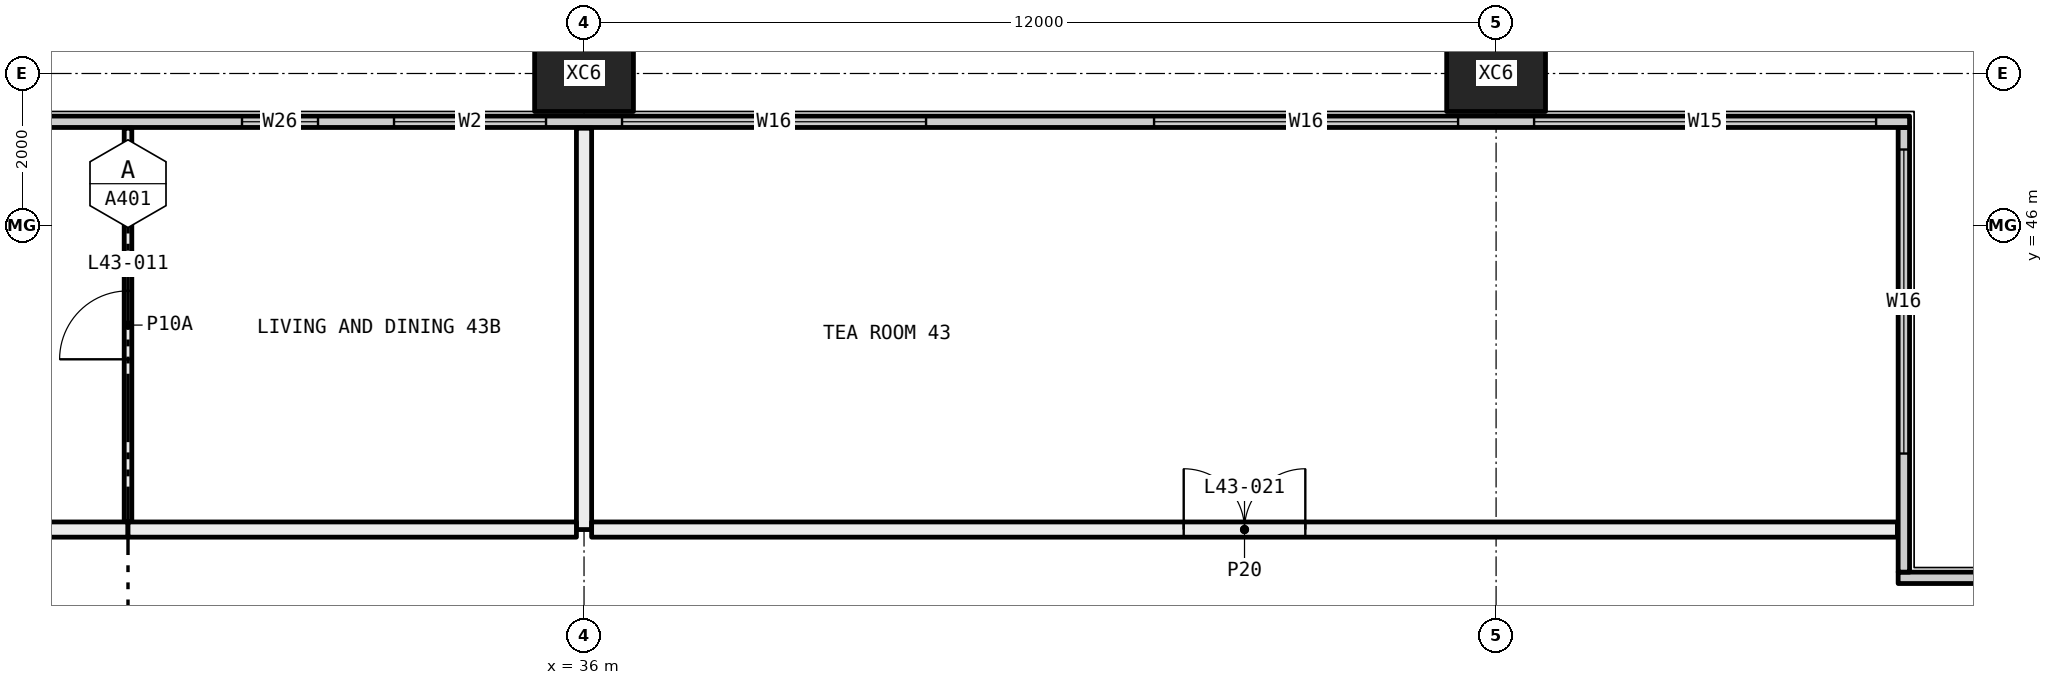
"""IFC4 building model, lengths in metres.
Left out: names, types, materials, properties, quantities, classifications, styles, units other than length and angle.
Written with IfcOpenShell. Run it as: python <this file> out.ifc"""

import sys

from ifc_helpers import new_model, si_unit, direction, frame, frame_2d, origin, origin_2d, place, context, subcontext, project, spatial, rectangle, hollow_rectangle, extrude, element, fill, save


model = new_model("IFC4")
c1 = context("Model", 3, precision=1e-05, world=origin(), true_north=direction((0.0, 1.0)))
c2 = subcontext(c1, "Body", "Model", "MODEL_VIEW")
j1 = project(units=[si_unit("LENGTHUNIT", "METRE"), si_unit("PLANEANGLEUNIT", "RADIAN")], contexts=[c1])
p1 = place(None, origin())
s1 = spatial("IfcSite", under=j1, at=p1, CompositionType="ELEMENT")
p2 = place(p1, origin())
s2 = spatial("IfcBuilding", under=s1, at=p2, CompositionType="ELEMENT")
p3 = place(p2, frame((0.0, 0.0, 165.15)))
s3 = spatial("IfcBuildingStorey", under=s2, at=p3, CompositionType="ELEMENT", Elevation=165.15)
for number, where, z_axis, x_axis in (
    (1, (36.0, 48.0, -0.4), (0.0, 0.0, 1.0), (1.0, 0.0, 0.0)),
    (2, (48.0, 48.0, -0.4), (0.0, 0.0, 1.0), (1.0, 0.0, 0.0)),
):
    element("IfcColumn", number, at=place(p3, frame(where, z_axis=z_axis, x_axis=x_axis)), inside=s3, PredefinedType="COLUMN", context=c2, shape_type="SweptSolid", body=[
        extrude(hollow_rectangle(XDim=1.3, YDim=1.0, WallThickness=0.05, at=origin_2d()), origin(), (0.0, 0.0, 1.0), 3.45),
    ])
p4 = place(p3, frame((53.29, 41.365, 0.0), z_axis=(0.0, 0.0, 1.0), x_axis=(1.0, 0.0, 0.0)))
e3 = element("IfcWall", 3, at=p4, inside=s3, PredefinedType="ELEMENTEDWALL", context=c2, shape_type="SweptSolid", body=[
    extrude(rectangle(XDim=6.15, YDim=0.15, at=frame_2d((3.075, 0.0))), origin(), (0.0, 0.0, 1.0), 3.05),
])
p5 = place(p4, frame((1.71, 0.0, 0.45)))
e4 = element("IfcOpeningElement", 4, at=p5, cuts=e3, PredefinedType="OPENING", context=c2, shape_type="SweptSolid", body=[
    extrude(rectangle(XDim=4.0, YDim=2.55, at=frame_2d((2.0, 1.275))), frame((0.0, 0.085, 0.0), z_axis=(0.0, -1.0, 0.0), x_axis=(1.0, 0.0, 0.0)), (0.0, 0.0, 1.0), 0.17),
])
p6 = place(p3, frame((53.365, 41.44, 0.0), z_axis=(0.0, 0.0, 1.0), x_axis=(0.0, 1.0, 0.0)))
e5 = element("IfcWall", 5, at=p6, inside=s3, PredefinedType="ELEMENTEDWALL", context=c2, shape_type="SweptSolid", body=[
    extrude(rectangle(XDim=5.85, YDim=0.15, at=frame_2d((2.925, 0.0))), origin(), (0.0, 0.0, 1.0), 3.05),
])
p7 = place(p6, frame((1.56, 0.0, 0.45)))
e6 = element("IfcOpeningElement", 6, at=p7, cuts=e5, PredefinedType="OPENING", context=c2, shape_type="SweptSolid", body=[
    extrude(rectangle(XDim=4.0, YDim=2.55, at=frame_2d((2.0, 1.275))), frame((0.0, 0.085, 0.0), z_axis=(0.0, -1.0, 0.0), x_axis=(1.0, 0.0, 0.0)), (0.0, 0.0, 1.0), 0.17),
])
p8 = place(p3, frame((6.56, 47.365, 0.0), z_axis=(0.0, 0.0, 1.0), x_axis=(1.0, 0.0, 0.0)))
e7 = element("IfcWall", 7, at=p8, inside=s3, PredefinedType="ELEMENTEDWALL", context=c2, shape_type="SweptSolid", body=[
    extrude(rectangle(XDim=46.88, YDim=0.15, at=frame_2d((23.44, 0.0))), origin(), (0.0, 0.0, 1.0), 3.05),
])
p9 = place(p8, frame((0.44, 0.0, 0.45)))
e8 = element("IfcOpeningElement", 8, at=p9, cuts=e7, PredefinedType="OPENING", context=c2, shape_type="SweptSolid", body=[
    extrude(rectangle(XDim=4.5, YDim=2.55, at=frame_2d((2.25, 1.275))), frame((0.0, 0.085, 0.0), z_axis=(0.0, -1.0, 0.0), x_axis=(1.0, 0.0, 0.0)), (0.0, 0.0, 1.0), 0.17),
])
p10 = place(p8, frame((5.94, 0.0, 0.45)))
e9 = element("IfcOpeningElement", 9, at=p10, cuts=e7, PredefinedType="OPENING", context=c2, shape_type="SweptSolid", body=[
    extrude(rectangle(XDim=4.0, YDim=2.55, at=frame_2d((2.0, 1.275))), frame((0.0, 0.085, 0.0), z_axis=(0.0, -1.0, 0.0), x_axis=(1.0, 0.0, 0.0)), (0.0, 0.0, 1.0), 0.17),
])
p11 = place(p8, frame((12.94, 0.0, 0.45)))
e10 = element("IfcOpeningElement", 10, at=p11, cuts=e7, PredefinedType="OPENING", context=c2, shape_type="SweptSolid", body=[
    extrude(rectangle(XDim=4.0, YDim=2.55, at=frame_2d((2.0, 1.275))), frame((0.0, 0.085, 0.0), z_axis=(0.0, -1.0, 0.0), x_axis=(1.0, 0.0, 0.0)), (0.0, 0.0, 1.0), 0.17),
])
p12 = place(p8, frame((17.94, 0.0, 0.45)))
e11 = element("IfcOpeningElement", 11, at=p12, cuts=e7, PredefinedType="OPENING", context=c2, shape_type="SweptSolid", body=[
    extrude(rectangle(XDim=4.0, YDim=2.55, at=frame_2d((2.0, 1.275))), frame((0.0, 0.085, 0.0), z_axis=(0.0, -1.0, 0.0), x_axis=(1.0, 0.0, 0.0)), (0.0, 0.0, 1.0), 0.17),
])
p13 = place(p8, frame((24.94, 0.0, 0.45)))
e12 = element("IfcOpeningElement", 12, at=p13, cuts=e7, PredefinedType="OPENING", context=c2, shape_type="SweptSolid", body=[
    extrude(rectangle(XDim=1.0, YDim=2.55, at=frame_2d((0.5, 1.275))), frame((0.0, 0.085, 0.0), z_axis=(0.0, -1.0, 0.0), x_axis=(1.0, 0.0, 0.0)), (0.0, 0.0, 1.0), 0.17),
])
p14 = place(p8, frame((26.94, 0.0, 0.45)))
e13 = element("IfcOpeningElement", 13, at=p14, cuts=e7, PredefinedType="OPENING", context=c2, shape_type="SweptSolid", body=[
    extrude(rectangle(XDim=2.0, YDim=2.55, at=frame_2d((1.0, 1.275))), frame((0.0, 0.085, 0.0), z_axis=(0.0, -1.0, 0.0), x_axis=(1.0, 0.0, 0.0)), (0.0, 0.0, 1.0), 0.17),
])
p15 = place(p8, frame((29.94, 0.0, 0.45)))
e14 = element("IfcOpeningElement", 14, at=p15, cuts=e7, PredefinedType="OPENING", context=c2, shape_type="SweptSolid", body=[
    extrude(rectangle(XDim=4.0, YDim=2.55, at=frame_2d((2.0, 1.275))), frame((0.0, 0.085, 0.0), z_axis=(0.0, -1.0, 0.0), x_axis=(1.0, 0.0, 0.0)), (0.0, 0.0, 1.0), 0.17),
])
p16 = place(p8, frame((36.94, 0.0, 0.45)))
e15 = element("IfcOpeningElement", 15, at=p16, cuts=e7, PredefinedType="OPENING", context=c2, shape_type="SweptSolid", body=[
    extrude(rectangle(XDim=4.0, YDim=2.55, at=frame_2d((2.0, 1.275))), frame((0.0, 0.085, 0.0), z_axis=(0.0, -1.0, 0.0), x_axis=(1.0, 0.0, 0.0)), (0.0, 0.0, 1.0), 0.17),
])
p17 = place(p8, frame((41.94, 0.0, 0.45)))
e16 = element("IfcOpeningElement", 16, at=p17, cuts=e7, PredefinedType="OPENING", context=c2, shape_type="SweptSolid", body=[
    extrude(rectangle(XDim=4.5, YDim=2.55, at=frame_2d((2.25, 1.275))), frame((0.0, 0.085, 0.0), z_axis=(0.0, -1.0, 0.0), x_axis=(1.0, 0.0, 0.0)), (0.0, 0.0, 1.0), 0.17),
])
p18 = place(p3, frame((30.0, 42.1, 0.0), z_axis=(0.0, 0.0, 1.0), x_axis=(0.0, 1.0, 0.0)))
e17 = element("IfcWall", 17, at=p18, inside=s3, PredefinedType="PARTITIONING", context=c2, shape_type="SweptSolid", body=[
    extrude(rectangle(XDim=5.18, YDim=0.1, at=frame_2d((2.59, 0.0))), origin(), (0.0, 0.0, 1.0), 3.05),
])
p19 = place(p18, frame((2.14, 0.0, 0.0)))
e18 = element("IfcOpeningElement", 18, at=p19, cuts=e17, PredefinedType="OPENING", context=c2, shape_type="SweptSolid", body=[
    extrude(rectangle(XDim=0.9, YDim=2.1, at=frame_2d((0.45, 1.05))), frame((0.0, 0.06, 0.0), z_axis=(0.0, -1.0, 0.0), x_axis=(1.0, 0.0, 0.0)), (0.0, 0.0, 1.0), 0.12),
])
p20 = place(p3, frame((24.0, 42.0, 0.0), z_axis=(0.0, 0.0, 1.0), x_axis=(1.0, 0.0, 0.0)))
e19 = element("IfcWall", 19, at=p20, inside=s3, PredefinedType="PARTITIONING", context=c2, shape_type="SweptSolid", body=[
    extrude(rectangle(XDim=6.0, YDim=0.2, at=frame_2d((3.0, 0.0))), origin(), (0.0, 0.0, 1.0), 3.05),
])
p21 = place(p3, frame((36.0, 42.0, 0.0), z_axis=(0.0, 0.0, 1.0), x_axis=(0.0, 1.0, 0.0)))
e20 = element("IfcWall", 20, at=p21, inside=s3, PredefinedType="PARTITIONING", context=c2, shape_type="SweptSolid", body=[
    extrude(rectangle(XDim=5.28, YDim=0.2, at=frame_2d((2.64, 0.0))), origin(), (0.0, 0.0, 1.0), 2.45),
])
p22 = place(p3, frame((30.0, 42.0, 0.0), z_axis=(0.0, 0.0, 1.0), x_axis=(1.0, 0.0, 0.0)))
e21 = element("IfcWall", 21, at=p22, inside=s3, PredefinedType="PARTITIONING", context=c2, shape_type="SweptSolid", body=[
    extrude(rectangle(XDim=5.9, YDim=0.2, at=frame_2d((2.95, 0.0))), origin(), (0.0, 0.0, 1.0), 3.05),
])
p23 = place(p3, frame((36.1, 42.0, 0.0), z_axis=(0.0, 0.0, 1.0), x_axis=(1.0, 0.0, 0.0)))
e22 = element("IfcWall", 22, at=p23, inside=s3, PredefinedType="PARTITIONING", context=c2, shape_type="SweptSolid", body=[
    extrude(rectangle(XDim=17.18, YDim=0.2, at=frame_2d((8.59, 0.0))), origin(), (0.0, 0.0, 1.0), 3.05),
])
p24 = place(p23, frame((7.79, 0.0, 0.0)))
e23 = element("IfcOpeningElement", 23, at=p24, cuts=e22, PredefinedType="OPENING", context=c2, shape_type="SweptSolid", body=[
    extrude(rectangle(XDim=1.6, YDim=2.1, at=frame_2d((0.8, 1.05))), frame((0.0, 0.11, 0.0), z_axis=(0.0, -1.0, 0.0), x_axis=(1.0, 0.0, 0.0)), (0.0, 0.0, 1.0), 0.22),
])
p25 = place(p7, origin())
e24 = element("IfcWindow", 24, at=p25, inside=s3, PartitioningType="SINGLE_PANEL", PredefinedType="WINDOW", context=c2, shape_type="SweptSolid", body=[
    extrude(rectangle(XDim=4.0, YDim=2.55, at=frame_2d((2.0, 1.275))), frame((0.0, 0.03, 0.0), z_axis=(0.0, -1.0, 0.0), x_axis=(1.0, 0.0, 0.0)), (0.0, 0.0, 1.0), 0.06),
])
fill(e6, e24)
p26 = place(p13, origin())
e25 = element("IfcWindow", 25, at=p26, inside=s3, PartitioningType="SINGLE_PANEL", PredefinedType="WINDOW", context=c2, shape_type="SweptSolid", body=[
    extrude(rectangle(XDim=1.0, YDim=2.55, at=frame_2d((0.5, 1.275))), frame((0.0, 0.03, 0.0), z_axis=(0.0, -1.0, 0.0), x_axis=(1.0, 0.0, 0.0)), (0.0, 0.0, 1.0), 0.06),
])
fill(e12, e25)
p27 = place(p14, origin())
e26 = element("IfcWindow", 26, at=p27, inside=s3, PartitioningType="SINGLE_PANEL", PredefinedType="WINDOW", context=c2, shape_type="SweptSolid", body=[
    extrude(rectangle(XDim=2.0, YDim=2.55, at=frame_2d((1.0, 1.275))), frame((0.0, 0.03, 0.0), z_axis=(0.0, -1.0, 0.0), x_axis=(1.0, 0.0, 0.0)), (0.0, 0.0, 1.0), 0.06),
])
fill(e13, e26)
p28 = place(p15, origin())
e27 = element("IfcWindow", 27, at=p28, inside=s3, PartitioningType="SINGLE_PANEL", PredefinedType="WINDOW", context=c2, shape_type="SweptSolid", body=[
    extrude(rectangle(XDim=4.0, YDim=2.55, at=frame_2d((2.0, 1.275))), frame((0.0, 0.03, 0.0), z_axis=(0.0, -1.0, 0.0), x_axis=(1.0, 0.0, 0.0)), (0.0, 0.0, 1.0), 0.06),
])
fill(e14, e27)
p29 = place(p16, origin())
e28 = element("IfcWindow", 28, at=p29, inside=s3, PartitioningType="SINGLE_PANEL", PredefinedType="WINDOW", context=c2, shape_type="SweptSolid", body=[
    extrude(rectangle(XDim=4.0, YDim=2.55, at=frame_2d((2.0, 1.275))), frame((0.0, 0.03, 0.0), z_axis=(0.0, -1.0, 0.0), x_axis=(1.0, 0.0, 0.0)), (0.0, 0.0, 1.0), 0.06),
])
fill(e15, e28)
p30 = place(p17, origin())
e29 = element("IfcWindow", 29, at=p30, inside=s3, PartitioningType="SINGLE_PANEL", PredefinedType="WINDOW", context=c2, shape_type="SweptSolid", body=[
    extrude(rectangle(XDim=4.5, YDim=2.55, at=frame_2d((2.25, 1.275))), frame((0.0, 0.03, 0.0), z_axis=(0.0, -1.0, 0.0), x_axis=(1.0, 0.0, 0.0)), (0.0, 0.0, 1.0), 0.06),
])
fill(e16, e29)
p31 = place(p19, origin())
e30 = element("IfcDoor", 30, at=p31, inside=s3, OperationType="SINGLE_SWING_RIGHT", PredefinedType="DOOR", context=c2, shape_type="SweptSolid", body=[
    extrude(rectangle(XDim=0.9, YDim=2.1, at=frame_2d((0.45, 1.05))), frame((0.0, 0.025, 0.0), z_axis=(0.0, -1.0, 0.0), x_axis=(1.0, 0.0, 0.0)), (0.0, 0.0, 1.0), 0.05),
])
fill(e18, e30)
p32 = place(p24, origin())
e31 = element("IfcDoor", 31, at=p32, inside=s3, OperationType="DOUBLE_DOOR_SINGLE_SWING", PredefinedType="DOOR", context=c2, shape_type="SweptSolid", body=[
    extrude(rectangle(XDim=1.6, YDim=2.1, at=frame_2d((0.8, 1.05))), frame((0.0, 0.025, 0.0), z_axis=(0.0, -1.0, 0.0), x_axis=(1.0, 0.0, 0.0)), (0.0, 0.0, 1.0), 0.05),
])
fill(e23, e31)
save(model, sys.argv[1])
